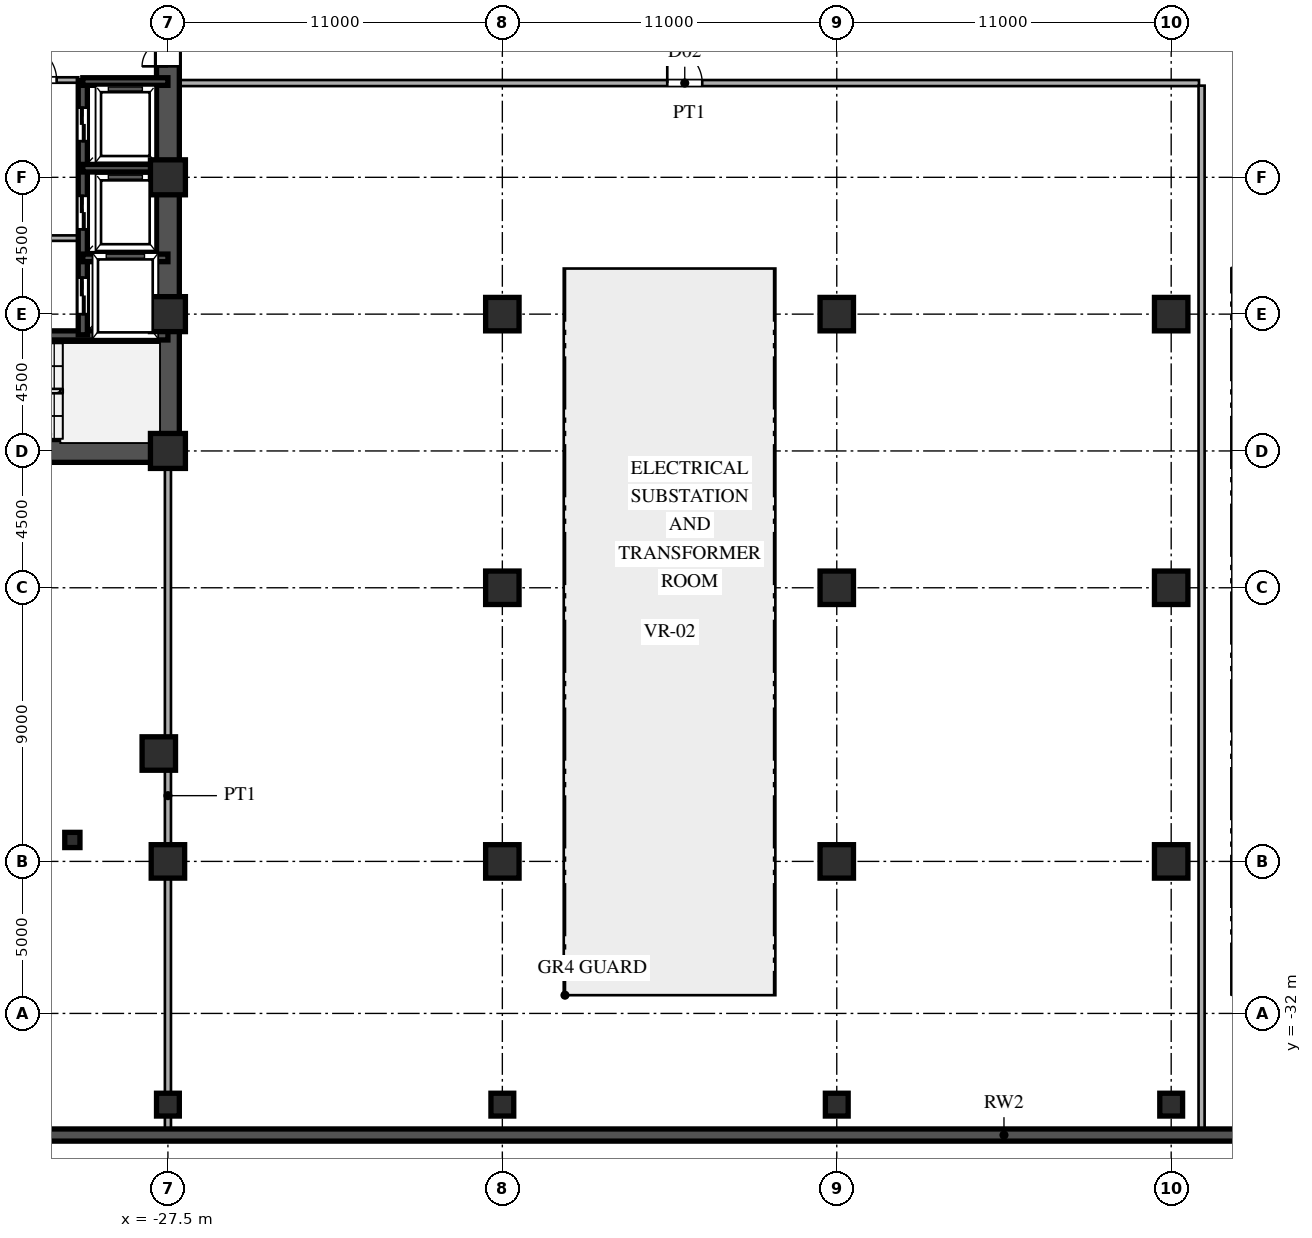
"""IFC4 building model, lengths in metres.
Left out: names, types, materials, properties, quantities, classifications, styles, units other than length and angle.
Written with IfcOpenShell. Run it as: python <this file> out.ifc"""

import sys

from ifc_helpers import new_model, si_unit, direction, frame, frame_2d, origin, origin_2d, place, context, subcontext, project, spatial, rectangle, hollow_rectangle, extrude, source, transform, mapped, element, fill, save


model = new_model("IFC4")
c1 = context("Model", 3, precision=1e-05, world=origin(), true_north=direction((0.0, 1.0)))
c2 = subcontext(c1, "Body", "Model", "MODEL_VIEW")
j1 = project(units=[si_unit("LENGTHUNIT", "METRE"), si_unit("PLANEANGLEUNIT", "RADIAN")], contexts=[c1])
p1 = place(None, origin())
s1 = spatial("IfcSite", under=j1, at=p1, CompositionType="ELEMENT")
p2 = place(p1, origin())
s2 = spatial("IfcBuilding", under=s1, at=p2, CompositionType="ELEMENT")
p3 = place(p2, frame((0.0, 0.0, -4.8)))
s3 = spatial("IfcBuildingStorey", under=s2, at=p3, CompositionType="ELEMENT", Elevation=-4.8)
m1 = source(origin(), c2, "Body", "SweptSolid", [
    extrude(hollow_rectangle(XDim=1.15, YDim=1.15, WallThickness=0.048, at=origin_2d()), origin(), (0.0, 0.0, 1.0), 4.8),
])
for number, where, z_axis, x_axis in (
    (1, (-27.5, -13.5, 0.0), (0.0, 0.0, 1.0), (1.0, 0.0, 0.0)),
    (2, (-27.5, -9.0, 0.0), (0.0, 0.0, 1.0), (1.0, 0.0, 0.0)),
    (3, (-27.5, -4.5, 0.0), (0.0, 0.0, 1.0), (1.0, 0.0, 0.0)),
):
    element("IfcColumn", number, at=place(p3, frame(where, z_axis=z_axis, x_axis=x_axis)), inside=s3, PredefinedType="COLUMN", context=c2, shape_type="MappedRepresentation", body=[
        mapped(m1, transform((0.0, 0.0, 0.0), scale=1.0)),
    ])
m2 = source(origin(), c2, "Body", "SweptSolid", [
    extrude(rectangle(XDim=1.1, YDim=1.1, at=origin_2d()), origin(), (0.0, 0.0, 1.0), 4.8),
])
p4 = place(p3, frame((-27.5, -27.0, 0.0), z_axis=(0.0, 0.0, 1.0), x_axis=(1.0, 0.0, 0.0)))
e4 = element("IfcColumn", 4, at=p4, inside=s3, PredefinedType="COLUMN", context=c2, shape_type="MappedRepresentation", body=[
    mapped(m2, transform((0.0, 0.0, 0.0), scale=1.0)),
])
m3 = source(origin(), c2, "Body", "SweptSolid", [
    extrude(hollow_rectangle(XDim=0.5, YDim=0.5, WallThickness=0.02, at=origin_2d()), origin(), (0.0, 0.0, 1.0), 4.8),
])
p5 = place(p3, frame((-30.643, -26.295, 0.0), z_axis=(0.0, 0.0, 1.0), x_axis=(1.0, 0.0, 0.0)))
e5 = element("IfcColumn", 5, at=p5, inside=s3, PredefinedType="COLUMN", context=c2, shape_type="MappedRepresentation", body=[
    mapped(m3, transform((0.0, 0.0, 0.0), scale=1.0)),
])
for number, where, z_axis, x_axis in (
    (6, (-27.8, -23.451, 0.0), (0.0, 0.0, 1.0), (1.0, 0.0, 0.0)),
    (7, (-16.5, -27.0, 0.0), (0.0, 0.0, 1.0), (1.0, 0.0, 0.0)),
    (8, (-16.5, -18.0, 0.0), (0.0, 0.0, 1.0), (1.0, 0.0, 0.0)),
    (9, (-16.5, -9.0, 0.0), (0.0, 0.0, 1.0), (1.0, 0.0, 0.0)),
    (10, (-5.5, -27.0, 0.0), (0.0, 0.0, 1.0), (1.0, 0.0, 0.0)),
    (11, (-5.5, -18.0, 0.0), (0.0, 0.0, 1.0), (1.0, 0.0, 0.0)),
    (12, (-5.5, -9.0, 0.0), (0.0, 0.0, 1.0), (1.0, 0.0, 0.0)),
    (13, (5.5, -27.0, 0.0), (0.0, 0.0, 1.0), (1.0, 0.0, 0.0)),
    (14, (5.5, -18.0, 0.0), (0.0, 0.0, 1.0), (1.0, 0.0, 0.0)),
    (15, (5.5, -9.0, 0.0), (0.0, 0.0, 1.0), (1.0, 0.0, 0.0)),
):
    element("IfcColumn", number, at=place(p3, frame(where, z_axis=z_axis, x_axis=x_axis)), inside=s3, PredefinedType="COLUMN", context=c2, shape_type="MappedRepresentation", body=[
        mapped(m2, transform((0.0, 0.0, 0.0), scale=1.0)),
    ])
m4 = source(origin(), c2, "Body", "SweptSolid", [
    extrude(rectangle(XDim=0.75, YDim=0.75, at=origin_2d()), origin(), (0.0, 0.0, 1.0), 4.8),
])
for number, where, z_axis, x_axis in (
    (16, (-27.5, -35.0, 0.0), (0.0, 0.0, 1.0), (1.0, 0.0, 0.0)),
    (17, (-16.5, -35.0, 0.0), (0.0, 0.0, 1.0), (1.0, 0.0, 0.0)),
    (18, (-5.5, -35.0, 0.0), (0.0, 0.0, 1.0), (1.0, 0.0, 0.0)),
    (19, (5.5, -35.0, 0.0), (0.0, 0.0, 1.0), (1.0, 0.0, 0.0)),
):
    element("IfcColumn", number, at=place(p3, frame(where, z_axis=z_axis, x_axis=x_axis)), inside=s3, PredefinedType="COLUMN", context=c2, shape_type="MappedRepresentation", body=[
        mapped(m4, transform((0.0, 0.0, 0.0), scale=1.0)),
    ])
p6 = place(p3, frame((-71.96, -36.0, 0.0), z_axis=(0.0, 0.0, 1.0), x_axis=(1.0, 0.0, 0.0)))
e20 = element("IfcWall", 20, at=p6, inside=s3, PredefinedType="USERDEFINED", context=c2, shape_type="SweptSolid", body=[
    extrude(rectangle(XDim=143.92, YDim=0.4, at=frame_2d((71.96, 0.0))), origin(), (0.0, 0.0, 1.0), 4.52),
])
p7 = place(p3, frame((-27.5, -13.5, 0.0), z_axis=(0.0, 0.0, 1.0), x_axis=(0.0, 1.0, 0.0)))
e21 = element("IfcWall", 21, at=p7, inside=s3, PredefinedType="SHEAR", context=c2, shape_type="SweptSolid", body=[
    extrude(rectangle(XDim=12.2, YDim=0.75, at=frame_2d((6.1, 0.0))), origin(), (0.0, 0.0, 1.0), 4.52),
])
p8 = place(p3, frame((-27.5, -1.3, 0.0), z_axis=(0.0, 0.0, 1.0), x_axis=(0.0, 1.0, 0.0)))
e22 = element("IfcWall", 22, at=p8, inside=s3, PredefinedType="SHEAR", context=c2, shape_type="SweptSolid", body=[
    extrude(rectangle(XDim=2.6, YDim=0.75, at=frame_2d((1.3, 0.0))), origin(), (0.0, 0.0, 1.0), 4.52),
])
p9 = place(p8, frame((0.45, 0.0, 0.0)))
e23 = element("IfcOpeningElement", 23, at=p9, cuts=e22, PredefinedType="OPENING", context=c2, shape_type="SweptSolid", body=[
    extrude(rectangle(XDim=1.7, YDim=2.35, at=frame_2d((0.85, 1.175))), frame((0.0, 0.385, 0.0), z_axis=(0.0, -1.0, 0.0), x_axis=(1.0, 0.0, 0.0)), (0.0, 0.0, 1.0), 0.77),
])
p10 = place(p3, frame((-36.5, -13.5, 0.0), z_axis=(0.0, 0.0, 1.0), x_axis=(1.0, 0.0, 0.0)))
e24 = element("IfcWall", 24, at=p10, inside=s3, PredefinedType="SHEAR", context=c2, shape_type="SweptSolid", body=[
    extrude(rectangle(XDim=9.0, YDim=0.75, at=frame_2d((4.5, 0.0))), origin(), (0.0, 0.0, 1.0), 4.52),
])
p11 = place(p3, frame((-36.5, -9.7, 0.0), z_axis=(0.0, 0.0, 1.0), x_axis=(1.0, 0.0, 0.0)))
e25 = element("IfcWall", 25, at=p11, inside=s3, PredefinedType="SHEAR", context=c2, shape_type="SweptSolid", body=[
    extrude(rectangle(XDim=9.0, YDim=0.3, at=frame_2d((4.5, 0.0))), origin(), (0.0, 0.0, 1.0), 4.52),
])
p12 = place(p11, frame((0.6, 0.0, 0.0)))
e26 = element("IfcOpeningElement", 26, at=p12, cuts=e25, PredefinedType="OPENING", context=c2, shape_type="SweptSolid", body=[
    extrude(rectangle(XDim=1.1, YDim=2.2, at=frame_2d((0.55, 1.1))), frame((0.0, 0.16, 0.0), z_axis=(0.0, -1.0, 0.0), x_axis=(1.0, 0.0, 0.0)), (0.0, 0.0, 1.0), 0.32),
])
for number, where, z_axis, x_axis in (
    (27, (-30.3, -7.15, 0.0), (0.0, 0.0, 1.0), (1.0, 0.0, 0.0)),
    (28, (-30.3, -4.2, 0.0), (0.0, 0.0, 1.0), (1.0, 0.0, 0.0)),
    (29, (-30.3, -1.35, 0.0), (0.0, 0.0, 1.0), (1.0, 0.0, 0.0)),
):
    element("IfcWall", number, at=place(p3, frame(where, z_axis=z_axis, x_axis=x_axis)), inside=s3, PredefinedType="SHEAR", context=c2, shape_type="SweptSolid", body=[
        extrude(rectangle(XDim=2.8, YDim=0.25, at=frame_2d((1.4, 0.0))), origin(), (0.0, 0.0, 1.0), 4.52),
    ])
p13 = place(p3, frame((-30.3, -9.68, 0.0), z_axis=(0.0, 0.0, 1.0), x_axis=(0.0, 1.0, 0.0)))
e30 = element("IfcWall", 30, at=p13, inside=s3, PredefinedType="SHEAR", context=c2, shape_type="SweptSolid", body=[
    extrude(rectangle(XDim=2.56, YDim=0.3, at=frame_2d((1.28, 0.0))), origin(), (0.0, 0.0, 1.0), 4.52),
])
p14 = place(p13, frame((0.68, 0.0, 0.0)))
e31 = element("IfcOpeningElement", 31, at=p14, cuts=e30, PredefinedType="OPENING", context=c2, shape_type="SweptSolid", body=[
    extrude(rectangle(XDim=1.2, YDim=2.25, at=frame_2d((0.6, 1.125))), frame((0.0, 0.16, 0.0), z_axis=(0.0, -1.0, 0.0), x_axis=(1.0, 0.0, 0.0)), (0.0, 0.0, 1.0), 0.32),
])
p15 = place(p3, frame((-30.3, -7.12, 0.0), z_axis=(0.0, 0.0, 1.0), x_axis=(0.0, 1.0, 0.0)))
e32 = element("IfcWall", 32, at=p15, inside=s3, PredefinedType="SHEAR", context=c2, shape_type="SweptSolid", body=[
    extrude(rectangle(XDim=2.92, YDim=0.3, at=frame_2d((1.46, 0.0))), origin(), (0.0, 0.0, 1.0), 4.52),
])
p16 = place(p15, frame((0.91, 0.0, 0.0)))
e33 = element("IfcOpeningElement", 33, at=p16, cuts=e32, PredefinedType="OPENING", context=c2, shape_type="SweptSolid", body=[
    extrude(rectangle(XDim=1.1, YDim=2.2, at=frame_2d((0.55, 1.1))), frame((0.0, 0.16, 0.0), z_axis=(0.0, -1.0, 0.0), x_axis=(1.0, 0.0, 0.0)), (0.0, 0.0, 1.0), 0.32),
])
p17 = place(p3, frame((-30.3, -4.2, 0.0), z_axis=(0.0, 0.0, 1.0), x_axis=(0.0, 1.0, 0.0)))
e34 = element("IfcWall", 34, at=p17, inside=s3, PredefinedType="SHEAR", context=c2, shape_type="SweptSolid", body=[
    extrude(rectangle(XDim=2.88, YDim=0.3, at=frame_2d((1.44, 0.0))), origin(), (0.0, 0.0, 1.0), 4.52),
])
p18 = place(p17, frame((0.89, 0.0, 0.0)))
e35 = element("IfcOpeningElement", 35, at=p18, cuts=e34, PredefinedType="OPENING", context=c2, shape_type="SweptSolid", body=[
    extrude(rectangle(XDim=1.1, YDim=2.2, at=frame_2d((0.55, 1.1))), frame((0.0, 0.16, 0.0), z_axis=(0.0, -1.0, 0.0), x_axis=(1.0, 0.0, 0.0)), (0.0, 0.0, 1.0), 0.32),
])
p19 = place(p3, frame((-36.15, -6.5, 0.0), z_axis=(0.0, 0.0, 1.0), x_axis=(1.0, 0.0, 0.0)))
e36 = element("IfcWall", 36, at=p19, inside=s3, PredefinedType="PARTITIONING", context=c2, shape_type="SweptSolid", body=[
    extrude(rectangle(XDim=5.7, YDim=0.18, at=frame_2d((2.85, 0.0))), origin(), (0.0, 0.0, 1.0), 4.52),
])
p20 = place(p3, frame((-33.02, -1.3, 0.0), z_axis=(0.0, 0.0, 1.0), x_axis=(1.0, 0.0, 0.0)))
e37 = element("IfcWall", 37, at=p20, inside=s3, PredefinedType="PARTITIONING", context=c2, shape_type="SweptSolid", body=[
    extrude(rectangle(XDim=2.57, YDim=0.18, at=frame_2d((1.285, 0.0))), origin(), (0.0, 0.0, 1.0), 4.52),
])
p21 = place(p20, frame((0.71, 0.0, 0.0)))
e38 = element("IfcOpeningElement", 38, at=p21, cuts=e37, PredefinedType="OPENING", context=c2, shape_type="SweptSolid", body=[
    extrude(rectangle(XDim=1.15, YDim=2.2, at=frame_2d((0.575, 1.1))), frame((0.0, 0.1, 0.0), z_axis=(0.0, -1.0, 0.0), x_axis=(1.0, 0.0, 0.0)), (0.0, 0.0, 1.0), 0.2),
])
p22 = place(p3, frame((-27.12, -1.4, 0.0), z_axis=(0.0, 0.0, 1.0), x_axis=(1.0, 0.0, 0.0)))
e39 = element("IfcWall", 39, at=p22, inside=s3, PredefinedType="PARTITIONING", context=c2, shape_type="SweptSolid", body=[
    extrude(rectangle(XDim=33.535, YDim=0.2, at=frame_2d((16.768, 0.0))), origin(), (0.0, 0.0, 1.0), 4.52),
])
p23 = place(p22, frame((16.045, 0.0, 0.0)))
e40 = element("IfcOpeningElement", 40, at=p23, cuts=e39, PredefinedType="OPENING", context=c2, shape_type="SweptSolid", body=[
    extrude(rectangle(XDim=1.15, YDim=2.2, at=frame_2d((0.575, 1.1))), frame((0.0, 0.11, 0.0), z_axis=(0.0, -1.0, 0.0), x_axis=(1.0, 0.0, 0.0)), (0.0, 0.0, 1.0), 0.22),
])
p24 = place(p3, frame((-27.5, -35.795, 0.0), z_axis=(0.0, 0.0, 1.0), x_axis=(0.0, 1.0, 0.0)))
e41 = element("IfcWall", 41, at=p24, inside=s3, PredefinedType="PARTITIONING", context=c2, shape_type="SweptSolid", body=[
    extrude(rectangle(XDim=0.775, YDim=0.2, at=frame_2d((0.387, 0.0))), origin(), (0.0, 0.0, 1.0), 4.52),
])
p25 = place(p3, frame((-27.5, -35.02, 0.0), z_axis=(0.0, 0.0, 1.0), x_axis=(0.0, 1.0, 0.0)))
e42 = element("IfcWall", 42, at=p25, inside=s3, PredefinedType="PARTITIONING", context=c2, shape_type="SweptSolid", body=[
    extrude(rectangle(XDim=8.04, YDim=0.2, at=frame_2d((4.02, 0.0))), origin(), (0.0, 0.0, 1.0), 3.72),
])
p26 = place(p3, frame((-27.5, -26.98, 0.0), z_axis=(0.0, 0.0, 1.0), x_axis=(0.0, 1.0, 0.0)))
e43 = element("IfcWall", 43, at=p26, inside=s3, PredefinedType="PARTITIONING", context=c2, shape_type="SweptSolid", body=[
    extrude(rectangle(XDim=5.167, YDim=0.2, at=frame_2d((2.584, 0.0))), origin(), (0.0, 0.0, 1.0), 4.52),
])
p27 = place(p3, frame((-27.5, -21.812, 0.0), z_axis=(0.0, 0.0, 1.0), x_axis=(0.0, 1.0, 0.0)))
e44 = element("IfcWall", 44, at=p27, inside=s3, PredefinedType="PARTITIONING", context=c2, shape_type="SweptSolid", body=[
    extrude(rectangle(XDim=7.933, YDim=0.2, at=frame_2d((3.966, 0.0))), origin(), (0.0, 0.0, 1.0), 3.932),
])
p28 = place(p3, frame((6.5, -35.795, 0.0), z_axis=(0.0, 0.0, 1.0), x_axis=(0.0, 1.0, 0.0)))
e45 = element("IfcWall", 45, at=p28, inside=s3, PredefinedType="PARTITIONING", context=c2, shape_type="SweptSolid", body=[
    extrude(rectangle(XDim=34.31, YDim=0.2, at=frame_2d((17.155, 0.0))), origin(), (0.0, 0.0, 1.0), 4.52),
])
m5 = source(origin(), c2, "Body", "SweptSolid", [
    extrude(rectangle(XDim=1.7, YDim=2.35, at=frame_2d((0.85, 1.175))), frame((0.0, 0.025, 0.0), z_axis=(0.0, -1.0, 0.0), x_axis=(1.0, 0.0, 0.0)), (0.0, 0.0, 1.0), 0.05),
])
p29 = place(p9, origin())
e46 = element("IfcDoor", 46, at=p29, inside=s3, OperationType="DOUBLE_SWING_LEFT", PredefinedType="DOOR", context=c2, shape_type="MappedRepresentation", body=[
    mapped(m5, transform((0.0, 0.0, 0.0), scale=1.0)),
])
fill(e23, e46)
m6 = source(origin(), c2, "Body", "SweptSolid", [
    extrude(rectangle(XDim=1.2, YDim=2.25, at=frame_2d((0.6, 1.125))), frame((0.0, 0.025, 0.0), z_axis=(0.0, -1.0, 0.0), x_axis=(1.0, 0.0, 0.0)), (0.0, 0.0, 1.0), 0.05),
])
p30 = place(p14, origin())
e47 = element("IfcDoor", 47, at=p30, inside=s3, OperationType="DOUBLE_DOOR_SLIDING", PredefinedType="DOOR", context=c2, shape_type="MappedRepresentation", body=[
    mapped(m6, transform((0.0, 0.0, 0.0), scale=1.0)),
])
fill(e31, e47)
m7 = source(origin(), c2, "Body", "SweptSolid", [
    extrude(rectangle(XDim=1.1, YDim=2.2, at=frame_2d((0.55, 1.1))), frame((0.0, 0.025, 0.0), z_axis=(0.0, -1.0, 0.0), x_axis=(1.0, 0.0, 0.0)), (0.0, 0.0, 1.0), 0.05),
])
p31 = place(p16, origin())
e48 = element("IfcDoor", 48, at=p31, inside=s3, OperationType="DOUBLE_DOOR_SLIDING", PredefinedType="DOOR", context=c2, shape_type="MappedRepresentation", body=[
    mapped(m7, transform((0.0, 0.0, 0.0), scale=1.0)),
])
fill(e33, e48)
p32 = place(p18, origin())
e49 = element("IfcDoor", 49, at=p32, inside=s3, OperationType="DOUBLE_DOOR_SLIDING", PredefinedType="DOOR", context=c2, shape_type="MappedRepresentation", body=[
    mapped(m7, transform((0.0, 0.0, 0.0), scale=1.0)),
])
fill(e35, e49)
m8 = source(origin(), c2, "Body", "SweptSolid", [
    extrude(rectangle(XDim=1.15, YDim=2.2, at=frame_2d((0.575, 1.1))), frame((0.0, 0.025, 0.0), z_axis=(0.0, -1.0, 0.0), x_axis=(1.0, 0.0, 0.0)), (0.0, 0.0, 1.0), 0.05),
])
p33 = place(p21, origin())
e50 = element("IfcDoor", 50, at=p33, inside=s3, OperationType="SINGLE_SWING_LEFT", PredefinedType="DOOR", context=c2, shape_type="MappedRepresentation", body=[
    mapped(m8, transform((0.0, 0.0, 0.0), scale=1.0)),
])
fill(e38, e50)
p34 = place(p23, origin())
e51 = element("IfcDoor", 51, at=p34, inside=s3, OperationType="SINGLE_SWING_LEFT", PredefinedType="DOOR", context=c2, shape_type="MappedRepresentation", body=[
    mapped(m8, transform((0.0, 0.0, 0.0), scale=1.0)),
])
fill(e40, e51)
save(model, sys.argv[1])
